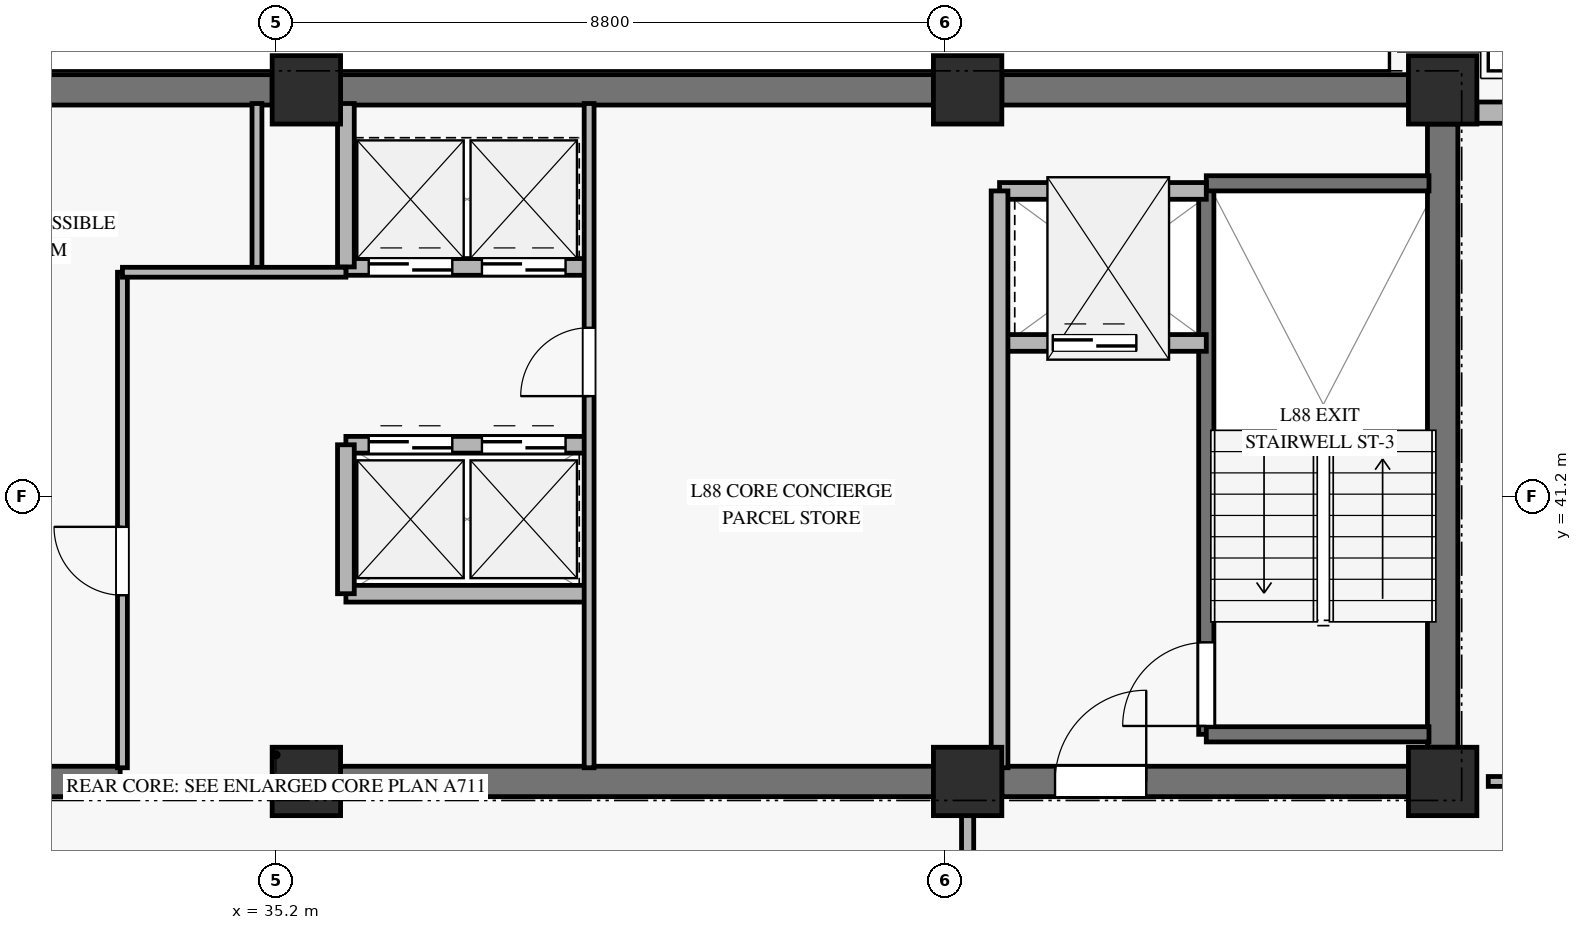
"""IFC4 building model, lengths in metres.
Left out: names, types, materials, properties, quantities, classifications, styles, units other than length and angle.
Written with IfcOpenShell. Run it as: python <this file> out.ifc"""

import sys

from ifc_helpers import new_model, si_unit, direction, frame, frame_2d, origin, origin_2d, place, context, subcontext, project, spatial, rectangle, extrude, source, transform, mapped, element, fill, save


model = new_model("IFC4")
c1 = context("Model", 3, precision=1e-05, world=origin(), true_north=direction((0.0, 1.0)))
c2 = subcontext(c1, "Body", "Model", "MODEL_VIEW")
j1 = project(units=[si_unit("LENGTHUNIT", "METRE"), si_unit("PLANEANGLEUNIT", "RADIAN")], contexts=[c1])
p1 = place(None, origin())
s1 = spatial("IfcSite", under=j1, at=p1, CompositionType="ELEMENT")
p2 = place(p1, origin())
s2 = spatial("IfcBuilding", under=s1, at=p2, CompositionType="ELEMENT")
p3 = place(p2, frame((0.0, 0.0, 339.1)))
s3 = spatial("IfcBuildingStorey", under=s2, at=p3, CompositionType="ELEMENT", Elevation=339.1)
m1 = source(origin(), c2, "Body", "SweptSolid", [
    extrude(rectangle(XDim=0.9, YDim=0.9, at=origin_2d()), origin(), (0.0, 0.0, 1.0), 3.185),
])
for number, where, z_axis, x_axis in (
    (1, (35.6, 37.45, 0.0), (0.0, 0.0, 1.0), (1.0, 0.0, 0.0)),
    (2, (35.6, 46.55, 0.0), (0.0, 0.0, 1.0), (1.0, 0.0, 0.0)),
    (3, (44.3, 37.45, 0.0), (0.0, 0.0, 1.0), (1.0, 0.0, 0.0)),
    (4, (44.3, 46.55, 0.0), (0.0, 0.0, 1.0), (1.0, 0.0, 0.0)),
    (5, (50.55, 37.45, 0.0), (0.0, 0.0, 1.0), (1.0, 0.0, 0.0)),
    (6, (50.55, 46.55, 0.0), (0.0, 0.0, 1.0), (1.0, 0.0, 0.0)),
):
    element("IfcColumn", number, at=place(p3, frame(where, z_axis=z_axis, x_axis=x_axis)), inside=s3, PredefinedType="PILASTER", context=c2, shape_type="MappedRepresentation", body=[
        mapped(m1, transform((0.0, 0.0, 0.0), x_axis=(1.0, 0.0, 0.0), y_axis=(0.0, 1.0, 0.0), z_axis=(0.0, 0.0, 1.0), scale=1.0)),
    ])
p4 = place(p3, frame((31.25, 46.55, 0.0), z_axis=(0.0, 0.0, 1.0), x_axis=(1.0, 0.0, 0.0)))
e7 = element("IfcWall", 7, at=p4, inside=s3, PredefinedType="SHEAR", context=c2, shape_type="SweptSolid", body=[
    extrude(rectangle(XDim=3.9, YDim=0.4, at=frame_2d((1.95, 0.0))), origin(), (0.0, 0.0, 1.0), 3.185),
])
p5 = place(p3, frame((36.05, 46.55, 0.0), z_axis=(0.0, 0.0, 1.0), x_axis=(1.0, 0.0, 0.0)))
e8 = element("IfcWall", 8, at=p5, inside=s3, PredefinedType="SHEAR", context=c2, shape_type="SweptSolid", body=[
    extrude(rectangle(XDim=7.8, YDim=0.4, at=frame_2d((3.9, 0.0))), origin(), (0.0, 0.0, 1.0), 3.185),
])
p6 = place(p3, frame((44.75, 46.55, 0.0), z_axis=(0.0, 0.0, 1.0), x_axis=(1.0, 0.0, 0.0)))
e9 = element("IfcWall", 9, at=p6, inside=s3, PredefinedType="SHEAR", context=c2, shape_type="SweptSolid", body=[
    extrude(rectangle(XDim=5.35, YDim=0.4, at=frame_2d((2.675, 0.0))), origin(), (0.0, 0.0, 1.0), 3.185),
])
p7 = place(p3, frame((31.25, 37.45, 0.0), z_axis=(0.0, 0.0, 1.0), x_axis=(1.0, 0.0, 0.0)))
e10 = element("IfcWall", 10, at=p7, inside=s3, PredefinedType="SHEAR", context=c2, shape_type="SweptSolid", body=[
    extrude(rectangle(XDim=1.9, YDim=0.4, at=frame_2d((0.95, 0.0))), origin(), (0.0, 0.0, 1.0), 3.185),
])
p8 = place(p3, frame((36.05, 37.45, 0.0), z_axis=(0.0, 0.0, 1.0), x_axis=(1.0, 0.0, 0.0)))
e11 = element("IfcWall", 11, at=p8, inside=s3, PredefinedType="SHEAR", context=c2, shape_type="SweptSolid", body=[
    extrude(rectangle(XDim=7.8, YDim=0.4, at=frame_2d((3.9, 0.0))), origin(), (0.0, 0.0, 1.0), 3.185),
])
p9 = place(p3, frame((44.75, 37.45, 0.0), z_axis=(0.0, 0.0, 1.0), x_axis=(1.0, 0.0, 0.0)))
e12 = element("IfcWall", 12, at=p9, inside=s3, PredefinedType="SHEAR", context=c2, shape_type="SweptSolid", body=[
    extrude(rectangle(XDim=5.35, YDim=0.4, at=frame_2d((2.675, 0.0))), origin(), (0.0, 0.0, 1.0), 3.185),
])
p10 = place(p9, frame((0.7, 0.0, 0.0)))
e13 = element("IfcOpeningElement", 13, at=p10, cuts=e12, PredefinedType="OPENING", context=c2, shape_type="SweptSolid", body=[
    extrude(rectangle(XDim=1.2, YDim=2.15, at=frame_2d((0.6, 1.075))), frame((0.0, 0.21, 0.0), z_axis=(0.0, -1.0, 0.0), x_axis=(1.0, 0.0, 0.0)), (0.0, 0.0, 1.0), 0.42),
])
p11 = place(p3, frame((50.55, 37.9, 0.0), z_axis=(0.0, 0.0, 1.0), x_axis=(0.0, 1.0, 0.0)))
e14 = element("IfcWall", 14, at=p11, inside=s3, PredefinedType="SHEAR", context=c2, shape_type="SweptSolid", body=[
    extrude(rectangle(XDim=8.2, YDim=0.4, at=frame_2d((4.1, 0.0))), origin(), (0.0, 0.0, 1.0), 3.185),
])
p12 = place(p3, frame((51.0, 46.25, 0.0), z_axis=(0.0, 0.0, 1.0), x_axis=(1.0, 0.0, 0.0)))
e15 = element("IfcWall", 15, at=p12, inside=s3, PredefinedType="SOLIDWALL", context=c2, shape_type="SweptSolid", body=[
    extrude(rectangle(XDim=5.269, YDim=0.28, at=frame_2d((2.635, 0.0))), origin(), (0.0, 0.0, 1.0), 2.815),
])
p13 = place(p12, frame((1.834, 0.0, 0.45)))
e16 = element("IfcOpeningElement", 16, at=p13, cuts=e15, PredefinedType="OPENING", context=c2, shape_type="SweptSolid", body=[
    extrude(rectangle(XDim=1.6, YDim=2.0, at=frame_2d((0.8, 1.0))), frame((0.0, 0.15, 0.0), z_axis=(0.0, -1.0, 0.0), x_axis=(1.0, 0.0, 0.0)), (0.0, 0.0, 1.0), 0.3),
])
p14 = place(p3, frame((47.44, 38.07, 0.0), z_axis=(0.0, 0.0, 1.0), x_axis=(0.0, 1.0, 0.0)))
e17 = element("IfcWall", 17, at=p14, inside=s3, PredefinedType="SOLIDWALL", context=c2, shape_type="SweptSolid", body=[
    extrude(rectangle(XDim=7.25, YDim=0.2, at=frame_2d((3.625, 0.0))), origin(), (0.0, 0.0, 1.0), 3.4),
])
p15 = place(p14, frame((0.11, 0.0, 0.0)))
e18 = element("IfcOpeningElement", 18, at=p15, cuts=e17, PredefinedType="OPENING", context=c2, shape_type="SweptSolid", body=[
    extrude(rectangle(XDim=1.1, YDim=2.15, at=frame_2d((0.55, 1.075))), frame((0.0, 0.11, 0.0), z_axis=(0.0, -1.0, 0.0), x_axis=(1.0, 0.0, 0.0)), (0.0, 0.0, 1.0), 0.22),
])
for number, where, z_axis, x_axis in (
    (19, (47.44, 45.32, 0.0), (0.0, 0.0, 1.0), (1.0, 0.0, 0.0)),
    (20, (47.44, 38.07, 0.0), (0.0, 0.0, 1.0), (1.0, 0.0, 0.0)),
):
    element("IfcWall", number, at=place(p3, frame(where, z_axis=z_axis, x_axis=x_axis)), inside=s3, PredefinedType="SOLIDWALL", context=c2, shape_type="SweptSolid", body=[
        extrude(rectangle(XDim=2.93, YDim=0.2, at=frame_2d((1.465, 0.0))), origin(), (0.0, 0.0, 1.0), 3.4),
    ])
p16 = place(p3, frame((44.72, 43.22, 0.0), z_axis=(0.0, 0.0, 1.0), x_axis=(1.0, 0.0, 0.0)))
e21 = element("IfcWall", 21, at=p16, inside=s3, PredefinedType="SOLIDWALL", context=c2, shape_type="SweptSolid", body=[
    extrude(rectangle(XDim=2.72, YDim=0.22, at=frame_2d((1.36, 0.0))), origin(), (0.0, 0.0, 1.0), 3.185),
])
p17 = place(p16, frame((0.7, 0.0, 0.0)))
e22 = element("IfcOpeningElement", 22, at=p17, cuts=e21, PredefinedType="OPENING", context=c2, shape_type="SweptSolid", body=[
    extrude(rectangle(XDim=1.1, YDim=2.2, at=frame_2d((0.55, 1.1))), frame((0.0, 0.12, 0.0), z_axis=(0.0, -1.0, 0.0), x_axis=(1.0, 0.0, 0.0)), (0.0, 0.0, 1.0), 0.24),
])
p18 = place(p3, frame((44.72, 45.22, 0.0), z_axis=(0.0, 0.0, 1.0), x_axis=(1.0, 0.0, 0.0)))
e23 = element("IfcWall", 23, at=p18, inside=s3, PredefinedType="SOLIDWALL", context=c2, shape_type="SweptSolid", body=[
    extrude(rectangle(XDim=2.72, YDim=0.22, at=frame_2d((1.36, 0.0))), origin(), (0.0, 0.0, 1.0), 3.185),
])
p19 = place(p3, frame((44.72, 37.63, 0.0), z_axis=(0.0, 0.0, 1.0), x_axis=(0.0, 1.0, 0.0)))
e24 = element("IfcWall", 24, at=p19, inside=s3, PredefinedType="SOLIDWALL", context=c2, shape_type="SweptSolid", body=[
    extrude(rectangle(XDim=7.59, YDim=0.22, at=frame_2d((3.795, 0.0))), origin(), (0.0, 0.0, 1.0), 3.185),
])
p20 = place(p3, frame((36.12, 44.22, 0.0), z_axis=(0.0, 0.0, 1.0), x_axis=(1.0, 0.0, 0.0)))
e25 = element("IfcWall", 25, at=p20, inside=s3, PredefinedType="SOLIDWALL", context=c2, shape_type="SweptSolid", body=[
    extrude(rectangle(XDim=3.2, YDim=0.22, at=frame_2d((1.6, 0.0))), origin(), (0.0, 0.0, 1.0), 3.185),
])
p21 = place(p20, frame((0.3, 0.0, 0.0)))
e26 = element("IfcOpeningElement", 26, at=p21, cuts=e25, PredefinedType="OPENING", context=c2, shape_type="SweptSolid", body=[
    extrude(rectangle(XDim=1.1, YDim=2.2, at=frame_2d((0.55, 1.1))), frame((0.0, 0.12, 0.0), z_axis=(0.0, -1.0, 0.0), x_axis=(1.0, 0.0, 0.0)), (0.0, 0.0, 1.0), 0.24),
])
p22 = place(p20, frame((1.79, 0.0, 0.0)))
e27 = element("IfcOpeningElement", 27, at=p22, cuts=e25, PredefinedType="OPENING", context=c2, shape_type="SweptSolid", body=[
    extrude(rectangle(XDim=1.1, YDim=2.2, at=frame_2d((0.55, 1.1))), frame((0.0, 0.12, 0.0), z_axis=(0.0, -1.0, 0.0), x_axis=(1.0, 0.0, 0.0)), (0.0, 0.0, 1.0), 0.24),
])
p23 = place(p3, frame((36.12, 41.88, 0.0), z_axis=(0.0, 0.0, 1.0), x_axis=(1.0, 0.0, 0.0)))
e28 = element("IfcWall", 28, at=p23, inside=s3, PredefinedType="SOLIDWALL", context=c2, shape_type="SweptSolid", body=[
    extrude(rectangle(XDim=3.2, YDim=0.22, at=frame_2d((1.6, 0.0))), origin(), (0.0, 0.0, 1.0), 3.185),
])
p24 = place(p23, frame((0.3, 0.0, 0.0)))
e29 = element("IfcOpeningElement", 29, at=p24, cuts=e28, PredefinedType="OPENING", context=c2, shape_type="SweptSolid", body=[
    extrude(rectangle(XDim=1.1, YDim=2.2, at=frame_2d((0.55, 1.1))), frame((0.0, 0.12, 0.0), z_axis=(0.0, -1.0, 0.0), x_axis=(1.0, 0.0, 0.0)), (0.0, 0.0, 1.0), 0.24),
])
p25 = place(p23, frame((1.79, 0.0, 0.0)))
e30 = element("IfcOpeningElement", 30, at=p25, cuts=e28, PredefinedType="OPENING", context=c2, shape_type="SweptSolid", body=[
    extrude(rectangle(XDim=1.1, YDim=2.2, at=frame_2d((0.55, 1.1))), frame((0.0, 0.12, 0.0), z_axis=(0.0, -1.0, 0.0), x_axis=(1.0, 0.0, 0.0)), (0.0, 0.0, 1.0), 0.24),
])
p26 = place(p3, frame((36.12, 39.92, 0.0), z_axis=(0.0, 0.0, 1.0), x_axis=(1.0, 0.0, 0.0)))
e31 = element("IfcWall", 31, at=p26, inside=s3, PredefinedType="SOLIDWALL", context=c2, shape_type="SweptSolid", body=[
    extrude(rectangle(XDim=3.2, YDim=0.22, at=frame_2d((1.6, 0.0))), origin(), (0.0, 0.0, 1.0), 3.185),
])
p27 = place(p3, frame((36.12, 39.92, 0.0), z_axis=(0.0, 0.0, 1.0), x_axis=(0.0, 1.0, 0.0)))
e32 = element("IfcWall", 32, at=p27, inside=s3, PredefinedType="SOLIDWALL", context=c2, shape_type="SweptSolid", body=[
    extrude(rectangle(XDim=1.96, YDim=0.22, at=frame_2d((0.98, 0.0))), origin(), (0.0, 0.0, 1.0), 3.185),
])
p28 = place(p3, frame((36.12, 44.22, 0.0), z_axis=(0.0, 0.0, 1.0), x_axis=(0.0, 1.0, 0.0)))
e33 = element("IfcWall", 33, at=p28, inside=s3, PredefinedType="SOLIDWALL", context=c2, shape_type="SweptSolid", body=[
    extrude(rectangle(XDim=2.15, YDim=0.22, at=frame_2d((1.075, 0.0))), origin(), (0.0, 0.0, 1.0), 3.185),
])
p29 = place(p3, frame((33.18, 37.63, 0.0), z_axis=(0.0, 0.0, 1.0), x_axis=(0.0, 1.0, 0.0)))
e34 = element("IfcWall", 34, at=p29, inside=s3, PredefinedType="PARTITIONING", context=c2, shape_type="SweptSolid", body=[
    extrude(rectangle(XDim=6.52, YDim=0.13, at=frame_2d((3.26, 0.0))), origin(), (0.0, 0.0, 1.0), 2.27),
])
p30 = place(p29, frame((2.27, 0.0, 0.0)))
e35 = element("IfcOpeningElement", 35, at=p30, cuts=e34, PredefinedType="OPENING", context=c2, shape_type="SweptSolid", body=[
    extrude(rectangle(XDim=0.9, YDim=2.1, at=frame_2d((0.45, 1.05))), frame((0.0, 0.075, 0.0), z_axis=(0.0, -1.0, 0.0), x_axis=(1.0, 0.0, 0.0)), (0.0, 0.0, 1.0), 0.15),
])
p31 = place(p3, frame((34.95, 44.15, 0.0), z_axis=(0.0, 0.0, 1.0), x_axis=(0.0, 1.0, 0.0)))
e36 = element("IfcWall", 36, at=p31, inside=s3, PredefinedType="PARTITIONING", context=c2, shape_type="SweptSolid", body=[
    extrude(rectangle(XDim=2.22, YDim=0.13, at=frame_2d((1.11, 0.0))), origin(), (0.0, 0.0, 1.0), 3.185),
])
p32 = place(p3, frame((33.18, 44.15, 0.0), z_axis=(0.0, 0.0, 1.0), x_axis=(1.0, 0.0, 0.0)))
e37 = element("IfcWall", 37, at=p32, inside=s3, PredefinedType="PARTITIONING", context=c2, shape_type="SweptSolid", body=[
    extrude(rectangle(XDim=2.94, YDim=0.13, at=frame_2d((1.47, 0.0))), origin(), (0.0, 0.0, 1.0), 2.47),
])
p33 = place(p3, frame((39.32, 37.63, 0.0), z_axis=(0.0, 0.0, 1.0), x_axis=(0.0, 1.0, 0.0)))
e38 = element("IfcWall", 38, at=p33, inside=s3, PredefinedType="PARTITIONING", context=c2, shape_type="SweptSolid", body=[
    extrude(rectangle(XDim=8.74, YDim=0.13, at=frame_2d((4.37, 0.0))), origin(), (0.0, 0.0, 1.0), 3.185),
])
p34 = place(p33, frame((4.89, 0.0, 0.0)))
e39 = element("IfcOpeningElement", 39, at=p34, cuts=e38, PredefinedType="OPENING", context=c2, shape_type="SweptSolid", body=[
    extrude(rectangle(XDim=0.9, YDim=2.1, at=frame_2d((0.45, 1.05))), frame((0.0, 0.075, 0.0), z_axis=(0.0, -1.0, 0.0), x_axis=(1.0, 0.0, 0.0)), (0.0, 0.0, 1.0), 0.15),
])
p35 = place(p3, frame((44.3, 22.568, 0.0), z_axis=(0.0, 0.0, 1.0), x_axis=(0.0, 1.0, 0.0)))
e40 = element("IfcWall", 40, at=p35, inside=s3, PredefinedType="PARTITIONING", context=c2, shape_type="SweptSolid", body=[
    extrude(rectangle(XDim=14.882, YDim=0.16, at=frame_2d((7.441, 0.0))), origin(), (0.0, 0.0, 1.0), 2.47),
])
p36 = place(p35, frame((12.352, 0.0, 0.0)))
e41 = element("IfcOpeningElement", 41, at=p36, cuts=e40, PredefinedType="OPENING", context=c2, shape_type="SweptSolid", body=[
    extrude(rectangle(XDim=1.05, YDim=2.15, at=frame_2d((0.525, 1.075))), frame((0.0, 0.09, 0.0), z_axis=(0.0, -1.0, 0.0), x_axis=(1.0, 0.0, 0.0)), (0.0, 0.0, 1.0), 0.18),
])
p37 = place(p3, frame((51.15, 37.45, 0.0), z_axis=(0.0, 0.0, 1.0), x_axis=(1.0, 0.0, 0.0)))
e42 = element("IfcWall", 42, at=p37, inside=s3, PredefinedType="PARTITIONING", context=c2, shape_type="SweptSolid", body=[
    extrude(rectangle(XDim=7.565, YDim=0.13, at=frame_2d((3.783, 0.0))), origin(), (0.0, 0.0, 1.0), 2.82),
])
p38 = place(p37, frame((0.5, 0.0, 0.0)))
e43 = element("IfcOpeningElement", 43, at=p38, cuts=e42, PredefinedType="OPENING", context=c2, shape_type="SweptSolid", body=[
    extrude(rectangle(XDim=0.9, YDim=2.1, at=frame_2d((0.45, 1.05))), frame((0.0, 0.075, 0.0), z_axis=(0.0, -1.0, 0.0), x_axis=(1.0, 0.0, 0.0)), (0.0, 0.0, 1.0), 0.15),
])
p39 = place(p37, frame((5.735, 0.0, 0.0)))
e44 = element("IfcOpeningElement", 44, at=p39, cuts=e42, PredefinedType="OPENING", context=c2, shape_type="SweptSolid", body=[
    extrude(rectangle(XDim=0.95, YDim=2.1, at=frame_2d((0.475, 1.05))), frame((0.0, 0.075, 0.0), z_axis=(0.0, -1.0, 0.0), x_axis=(1.0, 0.0, 0.0)), (0.0, 0.0, 1.0), 0.15),
])
m2 = source(origin(), c2, "Body", "SweptSolid", [
    extrude(rectangle(XDim=1.1, YDim=2.15, at=frame_2d((0.55, 1.075))), frame((0.0, 0.025, 0.0), z_axis=(0.0, -1.0, 0.0), x_axis=(1.0, 0.0, 0.0)), (0.0, 0.0, 1.0), 0.05),
])
p40 = place(p15, origin())
e45 = element("IfcDoor", 45, at=p40, inside=s3, OperationType="SINGLE_SWING_LEFT", PredefinedType="DOOR", context=c2, shape_type="MappedRepresentation", body=[
    mapped(m2, transform((0.0, 0.0, 0.0), x_axis=(1.0, 0.0, 0.0), y_axis=(0.0, 1.0, 0.0), z_axis=(0.0, 0.0, 1.0), scale=1.0)),
])
fill(e18, e45)
m3 = source(origin(), c2, "Body", "SweptSolid", [
    extrude(rectangle(XDim=1.1, YDim=2.2, at=frame_2d((0.55, 1.1))), frame((0.0, 0.025, 0.0), z_axis=(0.0, -1.0, 0.0), x_axis=(1.0, 0.0, 0.0)), (0.0, 0.0, 1.0), 0.05),
])
p41 = place(p17, origin())
e46 = element("IfcDoor", 46, at=p41, inside=s3, OperationType="SLIDING_TO_LEFT", PredefinedType="DOOR", context=c2, shape_type="MappedRepresentation", body=[
    mapped(m3, transform((0.0, 0.0, 0.0), x_axis=(1.0, 0.0, 0.0), y_axis=(0.0, 1.0, 0.0), z_axis=(0.0, 0.0, 1.0), scale=1.0)),
])
fill(e22, e46)
m4 = source(origin(), c2, "Body", "SweptSolid", [
    extrude(rectangle(XDim=1.2, YDim=2.15, at=frame_2d((0.6, 1.075))), frame((0.0, 0.025, 0.0), z_axis=(0.0, -1.0, 0.0), x_axis=(1.0, 0.0, 0.0)), (0.0, 0.0, 1.0), 0.05),
])
p42 = place(p10, origin())
e47 = element("IfcDoor", 47, at=p42, inside=s3, OperationType="SINGLE_SWING_RIGHT", PredefinedType="DOOR", context=c2, shape_type="MappedRepresentation", body=[
    mapped(m4, transform((0.0, 0.0, 0.0), x_axis=(1.0, 0.0, 0.0), y_axis=(0.0, 1.0, 0.0), z_axis=(0.0, 0.0, 1.0), scale=1.0)),
])
fill(e13, e47)
p43 = place(p21, origin())
e48 = element("IfcDoor", 48, at=p43, inside=s3, OperationType="SLIDING_TO_LEFT", PredefinedType="DOOR", context=c2, shape_type="MappedRepresentation", body=[
    mapped(m3, transform((0.0, 0.0, 0.0), x_axis=(1.0, 0.0, 0.0), y_axis=(0.0, 1.0, 0.0), z_axis=(0.0, 0.0, 1.0), scale=1.0)),
])
fill(e26, e48)
p44 = place(p22, origin())
e49 = element("IfcDoor", 49, at=p44, inside=s3, OperationType="SLIDING_TO_LEFT", PredefinedType="DOOR", context=c2, shape_type="MappedRepresentation", body=[
    mapped(m3, transform((0.0, 0.0, 0.0), x_axis=(1.0, 0.0, 0.0), y_axis=(0.0, 1.0, 0.0), z_axis=(0.0, 0.0, 1.0), scale=1.0)),
])
fill(e27, e49)
p45 = place(p24, origin())
e50 = element("IfcDoor", 50, at=p45, inside=s3, OperationType="SLIDING_TO_LEFT", PredefinedType="DOOR", context=c2, shape_type="MappedRepresentation", body=[
    mapped(m3, transform((0.0, 0.0, 0.0), x_axis=(1.0, 0.0, 0.0), y_axis=(0.0, 1.0, 0.0), z_axis=(0.0, 0.0, 1.0), scale=1.0)),
])
fill(e29, e50)
p46 = place(p25, origin())
e51 = element("IfcDoor", 51, at=p46, inside=s3, OperationType="SLIDING_TO_LEFT", PredefinedType="DOOR", context=c2, shape_type="MappedRepresentation", body=[
    mapped(m3, transform((0.0, 0.0, 0.0), x_axis=(1.0, 0.0, 0.0), y_axis=(0.0, 1.0, 0.0), z_axis=(0.0, 0.0, 1.0), scale=1.0)),
])
fill(e30, e51)
m5 = source(origin(), c2, "Body", "SweptSolid", [
    extrude(rectangle(XDim=0.9, YDim=2.1, at=frame_2d((0.45, 1.05))), frame((0.0, 0.025, 0.0), z_axis=(0.0, -1.0, 0.0), x_axis=(1.0, 0.0, 0.0)), (0.0, 0.0, 1.0), 0.05),
])
p47 = place(p30, origin())
e52 = element("IfcDoor", 52, at=p47, inside=s3, OperationType="SINGLE_SWING_RIGHT", PredefinedType="DOOR", context=c2, shape_type="MappedRepresentation", body=[
    mapped(m5, transform((0.0, 0.0, 0.0), x_axis=(1.0, 0.0, 0.0), y_axis=(0.0, 1.0, 0.0), z_axis=(0.0, 0.0, 1.0), scale=1.0)),
])
fill(e35, e52)
p48 = place(p34, origin())
e53 = element("IfcDoor", 53, at=p48, inside=s3, OperationType="SINGLE_SWING_LEFT", PredefinedType="DOOR", context=c2, shape_type="MappedRepresentation", body=[
    mapped(m5, transform((0.0, 0.0, 0.0), x_axis=(1.0, 0.0, 0.0), y_axis=(0.0, 1.0, 0.0), z_axis=(0.0, 0.0, 1.0), scale=1.0)),
])
fill(e39, e53)
save(model, sys.argv[1])
